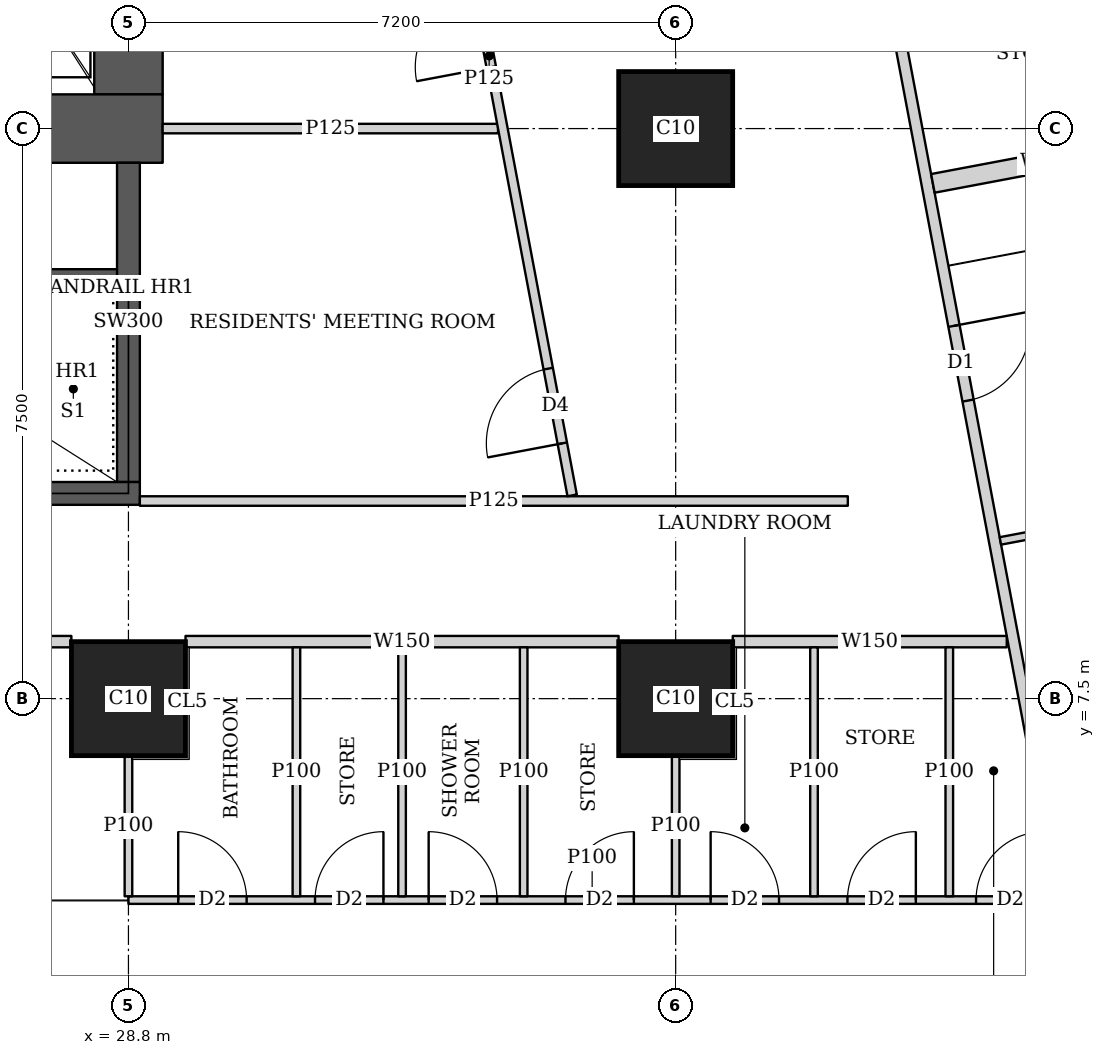
"""IFC4 building model, lengths in metres.
Left out: names, types, materials, properties, quantities, classifications, styles, units other than length and angle.
Written with IfcOpenShell. Run it as: python <this file> out.ifc"""

import sys

from ifc_helpers import new_model, si_unit, direction, frame, frame_2d, origin, origin_2d, place, context, subcontext, project, spatial, rectangle, extrude, element, fill, save


model = new_model("IFC4")
c1 = context("Model", 3, precision=1e-05, world=origin(), true_north=direction((0.0, 1.0)))
c2 = subcontext(c1, "Body", "Model", "MODEL_VIEW")
j1 = project(units=[si_unit("LENGTHUNIT", "METRE"), si_unit("PLANEANGLEUNIT", "RADIAN")], contexts=[c1])
p1 = place(None, origin())
s1 = spatial("IfcSite", under=j1, at=p1, CompositionType="ELEMENT")
p2 = place(p1, origin())
s2 = spatial("IfcBuilding", under=s1, at=p2, CompositionType="ELEMENT")
p3 = place(p2, frame((0.0, 0.0, 147.05)))
s3 = spatial("IfcBuildingStorey", under=s2, at=p3, CompositionType="ELEMENT", Elevation=147.05)
for number, where, z_axis, x_axis in (
    (1, (28.8, 7.5, 0.0), (0.0, 0.0, 1.0), (1.0, 0.0, 0.0)),
    (2, (36.0, 7.5, 0.0), (0.0, 0.0, 1.0), (1.0, 0.0, 0.0)),
    (3, (36.0, 15.0, 0.0), (0.0, 0.0, 1.0), (1.0, 0.0, 0.0)),
):
    element("IfcColumn", number, at=place(p3, frame(where, z_axis=z_axis, x_axis=x_axis)), inside=s3, PredefinedType="COLUMN", context=c2, shape_type="SweptSolid", body=[
        extrude(rectangle(XDim=1.5, YDim=1.5, at=origin_2d()), origin(), (0.0, 0.0, 1.0), 3.75),
    ])
p4 = place(p3, frame((13.95, 15.0, 0.0), z_axis=(0.0, 0.0, 1.0), x_axis=(1.0, 0.0, 0.0)))
e4 = element("IfcWall", 4, at=p4, inside=s3, PredefinedType="SHEAR", context=c2, shape_type="SweptSolid", body=[
    extrude(rectangle(XDim=15.3, YDim=0.9, at=frame_2d((7.65, 0.0))), origin(), (0.0, 0.0, 1.0), 3.75),
])
p5 = place(p4, frame((4.45, 0.0, 0.0)))
e5 = element("IfcOpeningElement", 5, at=p5, cuts=e4, PredefinedType="OPENING", context=c2, shape_type="SweptSolid", body=[
    extrude(rectangle(XDim=1.8, YDim=2.1, at=frame_2d((0.9, 1.05))), frame((0.0, 0.46, 0.0), z_axis=(0.0, -1.0, 0.0), x_axis=(1.0, 0.0, 0.0)), (0.0, 0.0, 1.0), 0.92),
])
p6 = place(p4, frame((10.7, 0.0, 0.0)))
e6 = element("IfcOpeningElement", 6, at=p6, cuts=e4, PredefinedType="OPENING", context=c2, shape_type="SweptSolid", body=[
    extrude(rectangle(XDim=1.1, YDim=2.1, at=frame_2d((0.55, 1.05))), frame((0.0, 0.46, 0.0), z_axis=(0.0, -1.0, 0.0), x_axis=(1.0, 0.0, 0.0)), (0.0, 0.0, 1.0), 0.92),
])
p7 = place(p3, frame((28.8, 15.45, 0.0), z_axis=(0.0, 0.0, 1.0), x_axis=(0.0, 1.0, 0.0)))
e7 = element("IfcWall", 7, at=p7, inside=s3, PredefinedType="SHEAR", context=c2, shape_type="SweptSolid", body=[
    extrude(rectangle(XDim=14.1, YDim=0.9, at=frame_2d((7.05, 0.0))), origin(), (0.0, 0.0, 1.0), 3.75),
])
p8 = place(p3, frame((21.45, 10.2, 0.0), z_axis=(0.0, 0.0, 1.0), x_axis=(1.0, 0.0, 0.0)))
e8 = element("IfcWall", 8, at=p8, inside=s3, PredefinedType="SHEAR", context=c2, shape_type="SweptSolid", body=[
    extrude(rectangle(XDim=7.5, YDim=0.3, at=frame_2d((3.75, 0.0))), origin(), (0.0, 0.0, 1.0), 3.75),
])
p9 = place(p8, frame((0.5, 0.0, 0.0)))
e9 = element("IfcOpeningElement", 9, at=p9, cuts=e8, PredefinedType="OPENING", context=c2, shape_type="SweptSolid", body=[
    extrude(rectangle(XDim=1.1, YDim=2.1, at=frame_2d((0.55, 1.05))), frame((0.0, 0.16, 0.0), z_axis=(0.0, -1.0, 0.0), x_axis=(1.0, 0.0, 0.0)), (0.0, 0.0, 1.0), 0.32),
])
p10 = place(p3, frame((28.8, 10.35, 0.0), z_axis=(0.0, 0.0, 1.0), x_axis=(0.0, 1.0, 0.0)))
e10 = element("IfcWall", 10, at=p10, inside=s3, PredefinedType="SHEAR", context=c2, shape_type="SweptSolid", body=[
    extrude(rectangle(XDim=4.2, YDim=0.3, at=frame_2d((2.1, 0.0))), origin(), (0.0, 0.0, 1.0), 3.75),
])
p11 = place(p3, frame((40.356, 8.25, 0.0), z_axis=(0.0, 0.0, 1.0), x_axis=(-1.0, 0.0, 0.0)))
e11 = element("IfcWall", 11, at=p11, inside=s3, PredefinedType="SOLIDWALL", context=c2, shape_type="SweptSolid", body=[
    extrude(rectangle(XDim=3.605, YDim=0.15, at=frame_2d((1.802, 0.0))), origin(), (0.0, 0.0, 1.0), 3.5),
])
p12 = place(p3, frame((35.249, 8.25, 0.0), z_axis=(0.0, 0.0, 1.0), x_axis=(-1.0, 0.0, 0.0)))
e12 = element("IfcWall", 12, at=p12, inside=s3, PredefinedType="SOLIDWALL", context=c2, shape_type="SweptSolid", body=[
    extrude(rectangle(XDim=5.698, YDim=0.15, at=frame_2d((2.849, 0.0))), origin(), (0.0, 0.0, 1.0), 3.5),
])
p13 = place(p3, frame((28.049, 8.25, 0.0), z_axis=(0.0, 0.0, 1.0), x_axis=(-1.0, 0.0, 0.0)))
e13 = element("IfcWall", 13, at=p13, inside=s3, PredefinedType="SOLIDWALL", context=c2, shape_type="SweptSolid", body=[
    extrude(rectangle(XDim=5.698, YDim=0.15, at=frame_2d((2.849, 0.0))), origin(), (0.0, 0.0, 1.0), 3.5),
])
p14 = place(p13, frame((0.749, 0.0, 0.0)))
e14 = element("IfcOpeningElement", 14, at=p14, cuts=e13, PredefinedType="OPENING", context=c2, shape_type="SweptSolid", body=[
    extrude(rectangle(XDim=1.0, YDim=2.1, at=frame_2d((0.5, 1.05))), frame((0.0, 0.085, 0.0), z_axis=(0.0, -1.0, 0.0), x_axis=(1.0, 0.0, 0.0)), (0.0, 0.0, 1.0), 0.17),
])
p15 = place(p3, frame((33.877, 43.029, 0.0), z_axis=(0.0, 0.0, 1.0), x_axis=(0.185596841028, -0.98262597798, 0.0)))
e15 = element("IfcWall", 15, at=p15, inside=s3, PredefinedType="SOLIDWALL", context=c2, shape_type="SweptSolid", body=[
    extrude(rectangle(XDim=41.66, YDim=0.15, at=frame_2d((20.83, 0.0))), origin(), (0.0, 0.0, 1.0), 2.5),
])
p16 = place(p15, frame((12.57, 0.0, 0.0)))
e16 = element("IfcOpeningElement", 16, at=p16, cuts=e15, PredefinedType="OPENING", context=c2, shape_type="SweptSolid", body=[
    extrude(rectangle(XDim=1.0, YDim=2.1, at=frame_2d((0.5, 1.05))), frame((0.0, 0.085, 0.0), z_axis=(0.0, -1.0, 0.0), x_axis=(1.0, 0.0, 0.0)), (0.0, 0.0, 1.0), 0.17),
])
p17 = place(p15, frame((16.386, 0.0, 0.0)))
e17 = element("IfcOpeningElement", 17, at=p17, cuts=e15, PredefinedType="OPENING", context=c2, shape_type="SweptSolid", body=[
    extrude(rectangle(XDim=1.0, YDim=2.1, at=frame_2d((0.5, 1.05))), frame((0.0, 0.085, 0.0), z_axis=(0.0, -1.0, 0.0), x_axis=(1.0, 0.0, 0.0)), (0.0, 0.0, 1.0), 0.17),
])
p18 = place(p15, frame((31.166, 0.0, 0.0)))
e18 = element("IfcOpeningElement", 18, at=p18, cuts=e15, PredefinedType="OPENING", context=c2, shape_type="SweptSolid", body=[
    extrude(rectangle(XDim=1.0, YDim=2.1, at=frame_2d((0.5, 1.05))), frame((0.0, 0.085, 0.0), z_axis=(0.0, -1.0, 0.0), x_axis=(1.0, 0.0, 0.0)), (0.0, 0.0, 1.0), 0.17),
])
p19 = place(p3, frame((41.002, 4.85, 0.0), z_axis=(0.0, 0.0, 1.0), x_axis=(-1.0, 0.0, 0.0)))
e19 = element("IfcWall", 19, at=p19, inside=s3, PredefinedType="PARTITIONING", context=c2, shape_type="SweptSolid", body=[
    extrude(rectangle(XDim=12.202, YDim=0.1, at=frame_2d((6.101, 0.0))), origin(), (0.0, 0.0, 1.0), 3.5),
])
p20 = place(p19, frame((10.647, 0.0, 0.0)))
e20 = element("IfcOpeningElement", 20, at=p20, cuts=e19, PredefinedType="OPENING", context=c2, shape_type="SweptSolid", body=[
    extrude(rectangle(XDim=0.9, YDim=2.1, at=frame_2d((0.45, 1.05))), frame((0.0, 0.06, 0.0), z_axis=(0.0, -1.0, 0.0), x_axis=(1.0, 0.0, 0.0)), (0.0, 0.0, 1.0), 0.12),
])
p21 = place(p19, frame((7.352, 0.0, 0.0)))
e21 = element("IfcOpeningElement", 21, at=p21, cuts=e19, PredefinedType="OPENING", context=c2, shape_type="SweptSolid", body=[
    extrude(rectangle(XDim=0.9, YDim=2.1, at=frame_2d((0.45, 1.05))), frame((0.0, 0.06, 0.0), z_axis=(0.0, -1.0, 0.0), x_axis=(1.0, 0.0, 0.0)), (0.0, 0.0, 1.0), 0.12),
])
p22 = place(p19, frame((3.642, 0.0, 0.0)))
e22 = element("IfcOpeningElement", 22, at=p22, cuts=e19, PredefinedType="OPENING", context=c2, shape_type="SweptSolid", body=[
    extrude(rectangle(XDim=0.9, YDim=2.1, at=frame_2d((0.45, 1.05))), frame((0.0, 0.06, 0.0), z_axis=(0.0, -1.0, 0.0), x_axis=(1.0, 0.0, 0.0)), (0.0, 0.0, 1.0), 0.12),
])
p23 = place(p19, frame((0.15, 0.0, 0.0)))
e23 = element("IfcOpeningElement", 23, at=p23, cuts=e19, PredefinedType="OPENING", context=c2, shape_type="SweptSolid", body=[
    extrude(rectangle(XDim=0.9, YDim=2.1, at=frame_2d((0.45, 1.05))), frame((0.0, 0.06, 0.0), z_axis=(0.0, -1.0, 0.0), x_axis=(1.0, 0.0, 0.0)), (0.0, 0.0, 1.0), 0.12),
])
p24 = place(p19, frame((8.847, 0.0, 0.0)))
e24 = element("IfcOpeningElement", 24, at=p24, cuts=e19, PredefinedType="OPENING", context=c2, shape_type="SweptSolid", body=[
    extrude(rectangle(XDim=0.9, YDim=2.1, at=frame_2d((0.45, 1.05))), frame((0.0, 0.06, 0.0), z_axis=(0.0, -1.0, 0.0), x_axis=(1.0, 0.0, 0.0)), (0.0, 0.0, 1.0), 0.12),
])
p25 = place(p19, frame((5.552, 0.0, 0.0)))
e25 = element("IfcOpeningElement", 25, at=p25, cuts=e19, PredefinedType="OPENING", context=c2, shape_type="SweptSolid", body=[
    extrude(rectangle(XDim=0.9, YDim=2.1, at=frame_2d((0.45, 1.05))), frame((0.0, 0.06, 0.0), z_axis=(0.0, -1.0, 0.0), x_axis=(1.0, 0.0, 0.0)), (0.0, 0.0, 1.0), 0.12),
])
p26 = place(p19, frame((1.842, 0.0, 0.0)))
e26 = element("IfcOpeningElement", 26, at=p26, cuts=e19, PredefinedType="OPENING", context=c2, shape_type="SweptSolid", body=[
    extrude(rectangle(XDim=0.9, YDim=2.1, at=frame_2d((0.45, 1.05))), frame((0.0, 0.06, 0.0), z_axis=(0.0, -1.0, 0.0), x_axis=(1.0, 0.0, 0.0)), (0.0, 0.0, 1.0), 0.12),
])
p27 = place(p3, frame((28.8, 4.9, 0.0), z_axis=(0.0, 0.0, 1.0), x_axis=(0.0, 1.0, 0.0)))
e27 = element("IfcWall", 27, at=p27, inside=s3, PredefinedType="PARTITIONING", context=c2, shape_type="SweptSolid", body=[
    extrude(rectangle(XDim=1.849, YDim=0.1, at=frame_2d((0.925, 0.0))), origin(), (0.0, 0.0, 1.0), 3.5),
])
p28 = place(p3, frame((32.4, 4.9, 0.0), z_axis=(0.0, 0.0, 1.0), x_axis=(0.0, 1.0, 0.0)))
e28 = element("IfcWall", 28, at=p28, inside=s3, PredefinedType="PARTITIONING", context=c2, shape_type="SweptSolid", body=[
    extrude(rectangle(XDim=3.275, YDim=0.1, at=frame_2d((1.638, 0.0))), origin(), (0.0, 0.0, 1.0), 3.5),
])
p29 = place(p3, frame((36.0, 4.9, 0.0), z_axis=(0.0, 0.0, 1.0), x_axis=(0.0, 1.0, 0.0)))
e29 = element("IfcWall", 29, at=p29, inside=s3, PredefinedType="PARTITIONING", context=c2, shape_type="SweptSolid", body=[
    extrude(rectangle(XDim=1.849, YDim=0.1, at=frame_2d((0.925, 0.0))), origin(), (0.0, 0.0, 1.0), 3.5),
])
for number, where, z_axis, x_axis in (
    (30, (39.6, 4.9, 0.0), (0.0, 0.0, 1.0), (0.0, 1.0, 0.0)),
    (31, (31.01, 4.9, 0.0), (0.0, 0.0, 1.0), (0.0, 1.0, 0.0)),
    (32, (34.0, 4.9, 0.0), (0.0, 0.0, 1.0), (0.0, 1.0, 0.0)),
    (33, (37.82, 4.9, 0.0), (0.0, 0.0, 1.0), (0.0, 1.0, 0.0)),
):
    element("IfcWall", number, at=place(p3, frame(where, z_axis=z_axis, x_axis=x_axis)), inside=s3, PredefinedType="PARTITIONING", context=c2, shape_type="SweptSolid", body=[
        extrude(rectangle(XDim=3.275, YDim=0.1, at=frame_2d((1.638, 0.0))), origin(), (0.0, 0.0, 1.0), 3.5),
    ])
p30 = place(p3, frame((43.49, 10.183, 0.0), z_axis=(0.0, 0.0, 1.0), x_axis=(-0.982607026909, -0.185697147715, 0.0)))
e34 = element("IfcWall", 34, at=p30, inside=s3, PredefinedType="PARTITIONING", context=c2, shape_type="SweptSolid", body=[
    extrude(rectangle(XDim=3.275, YDim=0.1, at=frame_2d((1.637, 0.0))), origin(), (0.0, 0.0, 1.0), 3.5),
])
p31 = place(p30, frame((1.2, 0.0, 0.0)))
e35 = element("IfcOpeningElement", 35, at=p31, cuts=e34, PredefinedType="OPENING", context=c2, shape_type="SweptSolid", body=[
    extrude(rectangle(XDim=0.9, YDim=2.1, at=frame_2d((0.45, 1.05))), frame((0.0, 0.06, 0.0), z_axis=(0.0, -1.0, 0.0), x_axis=(1.0, 0.0, 0.0)), (0.0, 0.0, 1.0), 0.12),
])
p32 = place(p3, frame((42.426, 14.853, 0.0), z_axis=(0.0, 0.0, 1.0), x_axis=(-0.982660840416, -0.185412169809, 0.0)))
e36 = element("IfcWall", 36, at=p32, inside=s3, PredefinedType="SOLIDWALL", context=c2, shape_type="SweptSolid", body=[
    extrude(rectangle(XDim=3.096, YDim=0.25, at=frame_2d((1.548, 0.0))), origin(), (0.0, 0.0, 1.0), 3.5),
])
p33 = place(p3, frame((28.95, 10.1, 0.0), z_axis=(0.0, 0.0, 1.0), x_axis=(1.0, 0.0, 0.0)))
e37 = element("IfcWall", 37, at=p33, inside=s3, PredefinedType="PARTITIONING", context=c2, shape_type="SweptSolid", body=[
    extrude(rectangle(XDim=9.315, YDim=0.125, at=frame_2d((4.657, 0.0))), origin(), (0.0, 0.0, 1.0), 3.5),
])
p34 = place(p3, frame((34.638, 10.174, 0.0), z_axis=(0.0, 0.0, 1.0), x_axis=(-0.185583626094, 0.982628473903, 0.0)))
e38 = element("IfcWall", 38, at=p34, inside=s3, PredefinedType="PARTITIONING", context=c2, shape_type="SweptSolid", body=[
    extrude(rectangle(XDim=11.767, YDim=0.125, at=frame_2d((5.884, 0.0))), origin(), (0.0, 0.0, 1.0), 3.5),
])
p35 = place(p34, frame((0.697, 0.0, 0.0)))
e39 = element("IfcOpeningElement", 39, at=p35, cuts=e38, PredefinedType="OPENING", context=c2, shape_type="SweptSolid", body=[
    extrude(rectangle(XDim=1.0, YDim=2.1, at=frame_2d((0.5, 1.05))), frame((0.0, 0.073, 0.0), z_axis=(0.0, -1.0, 0.0), x_axis=(1.0, 0.0, 0.0)), (0.0, 0.0, 1.0), 0.145),
])
p36 = place(p34, frame((5.734, 0.0, 0.0)))
e40 = element("IfcOpeningElement", 40, at=p36, cuts=e38, PredefinedType="OPENING", context=c2, shape_type="SweptSolid", body=[
    extrude(rectangle(XDim=1.0, YDim=2.1, at=frame_2d((0.5, 1.05))), frame((0.0, 0.073, 0.0), z_axis=(0.0, -1.0, 0.0), x_axis=(1.0, 0.0, 0.0)), (0.0, 0.0, 1.0), 0.145),
])
p37 = place(p3, frame((29.25, 15.0, 0.0), z_axis=(0.0, 0.0, 1.0), x_axis=(1.0, 0.0, 0.0)))
e41 = element("IfcWall", 41, at=p37, inside=s3, PredefinedType="PARTITIONING", context=c2, shape_type="SweptSolid", body=[
    extrude(rectangle(XDim=4.413, YDim=0.125, at=frame_2d((2.207, 0.0))), origin(), (0.0, 0.0, 1.0), 3.5),
])
p38 = place(p3, frame((23.0, 13.05, 0.0), z_axis=(0.0, 0.0, 1.0), x_axis=(1.0, 0.0, 0.0)))
e42 = element("IfcWall", 42, at=p38, inside=s3, PredefinedType="SHEAR", context=c2, shape_type="SweptSolid", body=[
    extrude(rectangle(XDim=5.8, YDim=0.2, at=frame_2d((2.9, 0.0))), origin(), (0.0, 0.0, 1.0), 3.75),
])
p39 = place(p20, origin())
e43 = element("IfcDoor", 43, at=p39, inside=s3, OperationType="SINGLE_SWING_LEFT", PredefinedType="DOOR", context=c2, shape_type="SweptSolid", body=[
    extrude(rectangle(XDim=0.9, YDim=2.1, at=frame_2d((0.45, 1.05))), frame((0.0, 0.025, 0.0), z_axis=(0.0, -1.0, 0.0), x_axis=(1.0, 0.0, 0.0)), (0.0, 0.0, 1.0), 0.05),
])
fill(e20, e43)
p40 = place(p21, origin())
e44 = element("IfcDoor", 44, at=p40, inside=s3, OperationType="SINGLE_SWING_LEFT", PredefinedType="DOOR", context=c2, shape_type="SweptSolid", body=[
    extrude(rectangle(XDim=0.9, YDim=2.1, at=frame_2d((0.45, 1.05))), frame((0.0, 0.025, 0.0), z_axis=(0.0, -1.0, 0.0), x_axis=(1.0, 0.0, 0.0)), (0.0, 0.0, 1.0), 0.05),
])
fill(e21, e44)
p41 = place(p22, origin())
e45 = element("IfcDoor", 45, at=p41, inside=s3, OperationType="SINGLE_SWING_LEFT", PredefinedType="DOOR", context=c2, shape_type="SweptSolid", body=[
    extrude(rectangle(XDim=0.9, YDim=2.1, at=frame_2d((0.45, 1.05))), frame((0.0, 0.025, 0.0), z_axis=(0.0, -1.0, 0.0), x_axis=(1.0, 0.0, 0.0)), (0.0, 0.0, 1.0), 0.05),
])
fill(e22, e45)
p42 = place(p23, origin())
e46 = element("IfcDoor", 46, at=p42, inside=s3, OperationType="SINGLE_SWING_RIGHT", PredefinedType="DOOR", context=c2, shape_type="SweptSolid", body=[
    extrude(rectangle(XDim=0.9, YDim=2.1, at=frame_2d((0.45, 1.05))), frame((0.0, 0.025, 0.0), z_axis=(0.0, -1.0, 0.0), x_axis=(1.0, 0.0, 0.0)), (0.0, 0.0, 1.0), 0.05),
])
fill(e23, e46)
p43 = place(p24, origin())
e47 = element("IfcDoor", 47, at=p43, inside=s3, OperationType="SINGLE_SWING_RIGHT", PredefinedType="DOOR", context=c2, shape_type="SweptSolid", body=[
    extrude(rectangle(XDim=0.9, YDim=2.1, at=frame_2d((0.45, 1.05))), frame((0.0, 0.025, 0.0), z_axis=(0.0, -1.0, 0.0), x_axis=(1.0, 0.0, 0.0)), (0.0, 0.0, 1.0), 0.05),
])
fill(e24, e47)
p44 = place(p25, origin())
e48 = element("IfcDoor", 48, at=p44, inside=s3, OperationType="SINGLE_SWING_RIGHT", PredefinedType="DOOR", context=c2, shape_type="SweptSolid", body=[
    extrude(rectangle(XDim=0.9, YDim=2.1, at=frame_2d((0.45, 1.05))), frame((0.0, 0.025, 0.0), z_axis=(0.0, -1.0, 0.0), x_axis=(1.0, 0.0, 0.0)), (0.0, 0.0, 1.0), 0.05),
])
fill(e25, e48)
p45 = place(p26, origin())
e49 = element("IfcDoor", 49, at=p45, inside=s3, OperationType="SINGLE_SWING_RIGHT", PredefinedType="DOOR", context=c2, shape_type="SweptSolid", body=[
    extrude(rectangle(XDim=0.9, YDim=2.1, at=frame_2d((0.45, 1.05))), frame((0.0, 0.025, 0.0), z_axis=(0.0, -1.0, 0.0), x_axis=(1.0, 0.0, 0.0)), (0.0, 0.0, 1.0), 0.05),
])
fill(e26, e49)
p46 = place(p18, origin())
e50 = element("IfcDoor", 50, at=p46, inside=s3, OperationType="SINGLE_SWING_LEFT", PredefinedType="DOOR", context=c2, shape_type="SweptSolid", body=[
    extrude(rectangle(XDim=1.0, YDim=2.1, at=frame_2d((0.5, 1.05))), frame((0.0, 0.025, 0.0), z_axis=(0.0, -1.0, 0.0), x_axis=(1.0, 0.0, 0.0)), (0.0, 0.0, 1.0), 0.05),
])
fill(e18, e50)
p47 = place(p35, origin())
e51 = element("IfcDoor", 51, at=p47, inside=s3, OperationType="SINGLE_SWING_LEFT", PredefinedType="DOOR", context=c2, shape_type="SweptSolid", body=[
    extrude(rectangle(XDim=1.0, YDim=2.1, at=frame_2d((0.5, 1.05))), frame((0.0, 0.025, 0.0), z_axis=(0.0, -1.0, 0.0), x_axis=(1.0, 0.0, 0.0)), (0.0, 0.0, 1.0), 0.05),
])
fill(e39, e51)
p48 = place(p36, origin())
e52 = element("IfcDoor", 52, at=p48, inside=s3, OperationType="SINGLE_SWING_LEFT", PredefinedType="DOOR", context=c2, shape_type="SweptSolid", body=[
    extrude(rectangle(XDim=1.0, YDim=2.1, at=frame_2d((0.5, 1.05))), frame((0.0, 0.025, 0.0), z_axis=(0.0, -1.0, 0.0), x_axis=(1.0, 0.0, 0.0)), (0.0, 0.0, 1.0), 0.05),
])
fill(e40, e52)
save(model, sys.argv[1])
